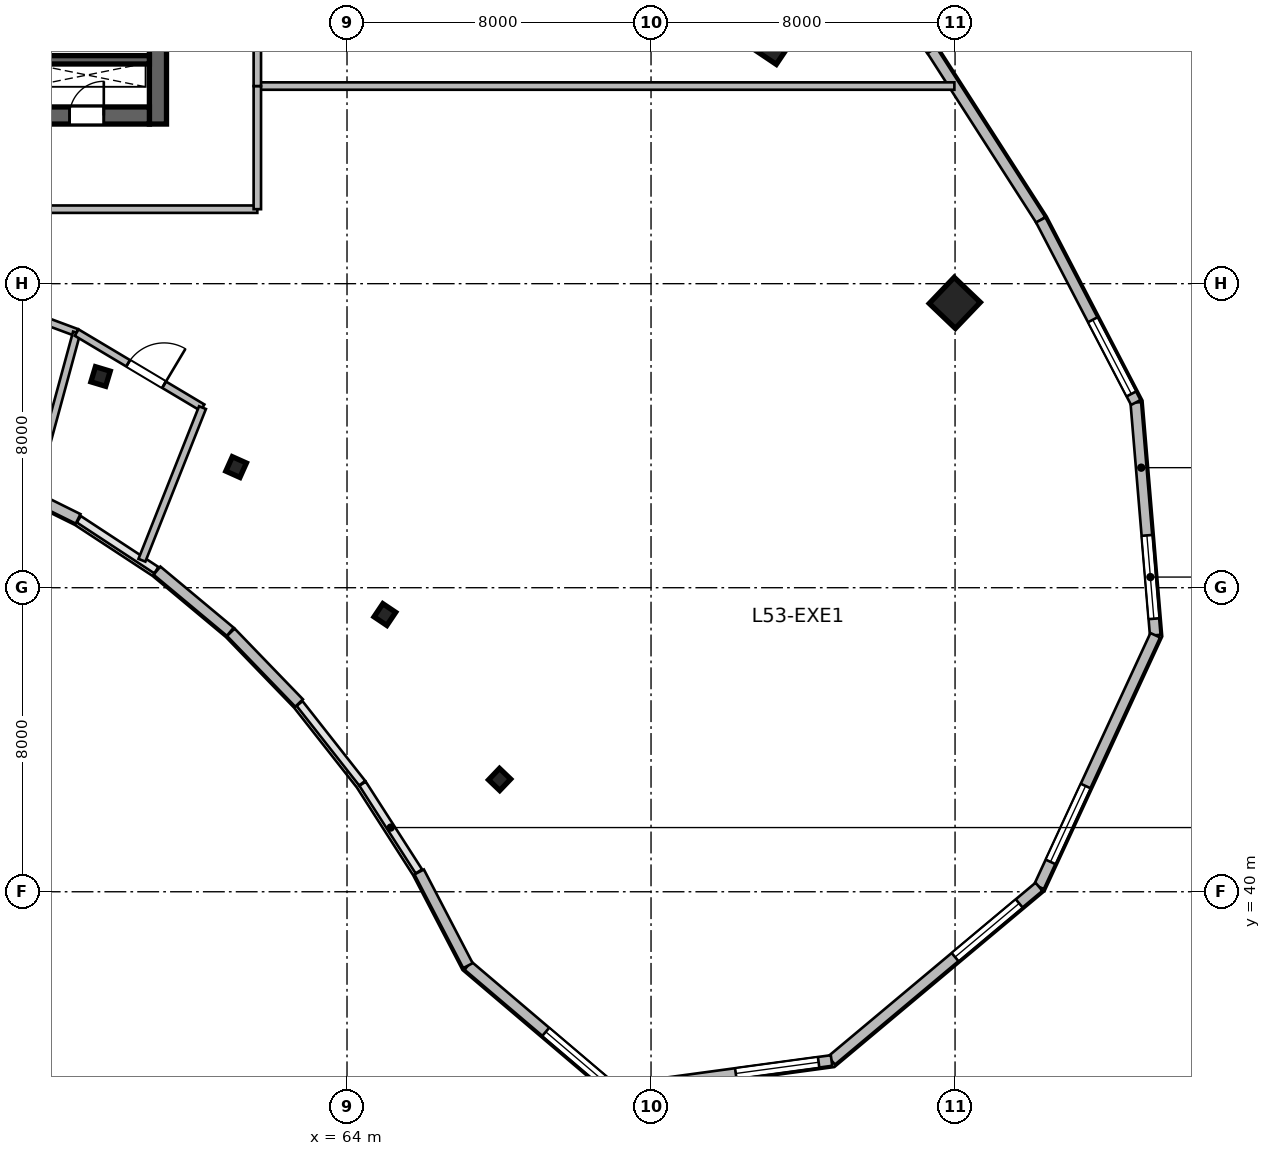
"""IFC4 building model, lengths in metres.
Left out: names, types, materials, properties, quantities, classifications, styles, units other than length and angle.
Written with IfcOpenShell. Run it as: python <this file> out.ifc"""

import sys

from ifc_helpers import new_model, si_unit, direction, frame, frame_2d, origin, origin_2d, place, context, subcontext, project, spatial, rectangle, i_section, extrude, source, transform, mapped, element, fill, save


model = new_model("IFC4")
c1 = context("Model", 3, precision=1e-05, world=origin(), true_north=direction((0.0, 1.0)))
c2 = subcontext(c1, "Body", "Model", "MODEL_VIEW")
j1 = project(units=[si_unit("LENGTHUNIT", "METRE"), si_unit("PLANEANGLEUNIT", "RADIAN")], contexts=[c1])
p1 = place(None, origin())
s1 = spatial("IfcSite", under=j1, at=p1, CompositionType="ELEMENT")
p2 = place(p1, origin())
s2 = spatial("IfcBuilding", under=s1, at=p2, CompositionType="ELEMENT")
p3 = place(p2, frame((0.0, 0.0, 219.6)))
s3 = spatial("IfcBuildingStorey", under=s2, at=p3, CompositionType="ELEMENT", Elevation=219.6)
m1 = source(origin(), c2, "Body", "SweptSolid", [
    extrude(rectangle(XDim=12.0, YDim=0.45, at=frame_2d((6.0, 0.0))), origin(), (0.0, 0.0, 1.0), 3.9),
])
p4 = place(p3, frame((59.025, 60.2, 0.0), z_axis=(0.0, 0.0, 1.0), x_axis=(0.0, 1.0, 0.0)))
e1 = element("IfcWall", 1, at=p4, inside=s3, PredefinedType="SHEAR", context=c2, shape_type="MappedRepresentation", body=[
    mapped(m1, transform((0.0, 0.0, 0.0), scale=1.0)),
])
m2 = source(origin(), c2, "Body", "SweptSolid", [
    extrude(rectangle(XDim=21.6, YDim=0.45, at=frame_2d((10.8, 0.0))), origin(), (0.0, 0.0, 1.0), 3.9),
])
p5 = place(p3, frame((37.2, 60.425, 0.0), z_axis=(0.0, 0.0, 1.0), x_axis=(1.0, 0.0, 0.0)))
e2 = element("IfcWall", 2, at=p5, inside=s3, PredefinedType="SHEAR", context=c2, shape_type="MappedRepresentation", body=[
    mapped(m2, transform((0.0, 0.0, 0.0), scale=1.0)),
])
p6 = place(p5, frame((1.1, 0.0, 0.0)))
e3 = element("IfcOpeningElement", 3, at=p6, cuts=e2, PredefinedType="OPENING", context=c2, shape_type="SweptSolid", body=[
    extrude(rectangle(XDim=1.15, YDim=2.15, at=frame_2d((0.575, 1.075))), frame((0.0, 0.235, 0.0), z_axis=(0.0, -1.0, 0.0), x_axis=(1.0, 0.0, 0.0)), (0.0, 0.0, 1.0), 0.47),
])
p7 = place(p5, frame((19.5, 0.0, 0.0)))
e4 = element("IfcOpeningElement", 4, at=p7, cuts=e2, PredefinedType="OPENING", context=c2, shape_type="SweptSolid", body=[
    extrude(rectangle(XDim=0.9, YDim=2.1, at=frame_2d((0.45, 1.05))), frame((0.0, 0.235, 0.0), z_axis=(0.0, -1.0, 0.0), x_axis=(1.0, 0.0, 0.0)), (0.0, 0.0, 1.0), 0.47),
])
p8 = place(p5, frame((12.02, 0.0, 0.0)))
e5 = element("IfcOpeningElement", 5, at=p8, cuts=e2, PredefinedType="OPENING", context=c2, shape_type="SweptSolid", body=[
    extrude(rectangle(XDim=1.6, YDim=2.15, at=frame_2d((0.8, 1.075))), frame((0.0, 0.235, 0.0), z_axis=(0.0, -1.0, 0.0), x_axis=(1.0, 0.0, 0.0)), (0.0, 0.0, 1.0), 0.47),
])
m3 = source(origin(), c2, "Body", "SweptSolid", [
    extrude(rectangle(XDim=3.27, YDim=0.22, at=frame_2d((1.635, 0.0))), origin(), (0.0, 0.0, 1.0), 3.9),
])
p9 = place(p3, frame((55.53, 61.89, 0.0), z_axis=(0.0, 0.0, 1.0), x_axis=(1.0, 0.0, 0.0)))
e6 = element("IfcWall", 6, at=p9, inside=s3, PredefinedType="SHEAR", context=c2, shape_type="MappedRepresentation", body=[
    mapped(m3, transform((0.0, 0.0, 0.0), scale=1.0)),
])
m4 = source(origin(), c2, "Body", "SweptSolid", [
    extrude(i_section(OverallWidth=0.406, OverallDepth=0.416, WebThickness=0.03, FlangeThickness=0.048, at=origin_2d()), origin(), (0.0, 0.0, 1.0), 3.9),
])
for number, where, z_axis, x_axis in (
    (7, (57.515, 53.558, 0.0), (0.0, 0.0, 1.0), (0.289, 0.957, 0.0)),
    (8, (61.082, 51.175, 0.0), (0.0, 0.0, 1.0), (0.409, 0.912, 0.0)),
    (9, (64.996, 47.294, 0.0), (0.0, 0.0, 1.0), (0.558, 0.83, 0.0)),
):
    element("IfcColumn", number, at=place(p3, frame(where, z_axis=z_axis, x_axis=x_axis)), inside=s3, PredefinedType="COLUMN", context=c2, shape_type="MappedRepresentation", body=[
        mapped(m4, transform((0.0, 0.0, 0.0), scale=1.0)),
    ])
m5 = source(origin(), c2, "Body", "SweptSolid", [
    extrude(rectangle(XDim=0.95, YDim=0.95, at=origin_2d()), origin(), (0.0, 0.0, 1.0), 3.9),
])
p10 = place(p3, frame((75.167, 62.43, 0.0), z_axis=(0.0, 0.0, 1.0), x_axis=(0.55774510898, 0.830012285095, 0.0)))
e10 = element("IfcColumn", 10, at=p10, inside=s3, PredefinedType="COLUMN", context=c2, shape_type="MappedRepresentation", body=[
    mapped(m5, transform((0.0, 0.0, 0.0), scale=1.0)),
])
p11 = place(p3, frame((68.015, 42.955, 0.0), z_axis=(0.0, 0.0, 1.0), x_axis=(0.690756218984, 0.723087716626, 0.0)))
e11 = element("IfcColumn", 11, at=p11, inside=s3, PredefinedType="COLUMN", context=c2, shape_type="MappedRepresentation", body=[
    mapped(m4, transform((0.0, 0.0, 0.0), scale=1.0)),
])
p12 = place(p3, frame((79.993, 55.494, 0.0), z_axis=(0.0, 0.0, 1.0), x_axis=(0.690756218984, 0.723087716626, 0.0)))
e12 = element("IfcColumn", 12, at=p12, inside=s3, PredefinedType="COLUMN", context=c2, shape_type="MappedRepresentation", body=[
    mapped(m5, transform((0.0, 0.0, 0.0), scale=1.0)),
])
m6 = source(origin(), c2, "Body", "SweptSolid", [
    extrude(rectangle(XDim=6.146, YDim=0.28, at=frame_2d((3.073, 0.0))), origin(), (0.0, 0.0, 1.0), 3.64),
])
p13 = place(p3, frame((84.756, 52.874, 0.0), z_axis=(0.0, 0.0, 1.0), x_axis=(0.083301904456, -0.996524356307, 0.0)))
e13 = element("IfcWall", 13, at=p13, inside=s3, PredefinedType="SOLIDWALL", context=c2, shape_type="MappedRepresentation", body=[
    mapped(m6, transform((0.0, 0.0, 0.0), scale=1.0)),
])
p14 = place(p13, frame((3.509, 0.0, 0.95)))
e14 = element("IfcOpeningElement", 14, at=p14, cuts=e13, PredefinedType="OPENING", context=c2, shape_type="SweptSolid", body=[
    extrude(rectangle(XDim=2.2, YDim=2.1, at=frame_2d((1.1, 1.05))), frame((0.0, 0.15, 0.0), z_axis=(0.0, -1.0, 0.0), x_axis=(1.0, 0.0, 0.0)), (0.0, 0.0, 1.0), 0.3),
])
m7 = source(origin(), c2, "Body", "SweptSolid", [
    extrude(rectangle(XDim=7.292, YDim=0.28, at=frame_2d((3.646, 0.0))), origin(), (0.0, 0.0, 1.0), 3.64),
])
p15 = place(p3, frame((85.268, 46.749, 0.0), z_axis=(0.0, 0.0, 1.0), x_axis=(-0.419642001049, -0.907689699708, 0.0)))
e15 = element("IfcWall", 15, at=p15, inside=s3, PredefinedType="SOLIDWALL", context=c2, shape_type="MappedRepresentation", body=[
    mapped(m7, transform((0.0, 0.0, 0.0), scale=1.0)),
])
p16 = place(p15, frame((4.369, 0.0, 0.95)))
e16 = element("IfcOpeningElement", 16, at=p16, cuts=e15, PredefinedType="OPENING", context=c2, shape_type="SweptSolid", body=[
    extrude(rectangle(XDim=2.2, YDim=2.1, at=frame_2d((1.1, 1.05))), frame((0.0, 0.15, 0.0), z_axis=(0.0, -1.0, 0.0), x_axis=(1.0, 0.0, 0.0)), (0.0, 0.0, 1.0), 0.3),
])
m8 = source(origin(), c2, "Body", "SweptSolid", [
    extrude(rectangle(XDim=7.12, YDim=0.28, at=frame_2d((3.56, 0.0))), origin(), (0.0, 0.0, 1.0), 3.64),
])
p17 = place(p3, frame((82.208, 40.131, 0.0), z_axis=(0.0, 0.0, 1.0), x_axis=(-0.766709783564, -0.641993853387, 0.0)))
e17 = element("IfcWall", 17, at=p17, inside=s3, PredefinedType="SOLIDWALL", context=c2, shape_type="MappedRepresentation", body=[
    mapped(m8, transform((0.0, 0.0, 0.0), scale=1.0)),
])
p18 = place(p17, frame((0.68, 0.0, 0.95)))
e18 = element("IfcOpeningElement", 18, at=p18, cuts=e17, PredefinedType="OPENING", context=c2, shape_type="SweptSolid", body=[
    extrude(rectangle(XDim=2.2, YDim=2.1, at=frame_2d((1.1, 1.05))), frame((0.0, 0.15, 0.0), z_axis=(0.0, -1.0, 0.0), x_axis=(1.0, 0.0, 0.0)), (0.0, 0.0, 1.0), 0.3),
])
m9 = source(origin(), c2, "Body", "SweptSolid", [
    extrude(rectangle(XDim=5.771, YDim=0.28, at=frame_2d((2.886, 0.0))), origin(), (0.0, 0.0, 1.0), 3.64),
])
p19 = place(p3, frame((76.75, 35.56, 0.0), z_axis=(0.0, 0.0, 1.0), x_axis=(-0.990933615537, -0.134352408237, 0.0)))
e19 = element("IfcWall", 19, at=p19, inside=s3, PredefinedType="SOLIDWALL", context=c2, shape_type="MappedRepresentation", body=[
    mapped(m9, transform((0.0, 0.0, 0.0), scale=1.0)),
])
p20 = place(p19, frame((0.343, 0.0, 0.95)))
e20 = element("IfcOpeningElement", 20, at=p20, cuts=e19, PredefinedType="OPENING", context=c2, shape_type="SweptSolid", body=[
    extrude(rectangle(XDim=2.2, YDim=2.1, at=frame_2d((1.1, 1.05))), frame((0.0, 0.15, 0.0), z_axis=(0.0, -1.0, 0.0), x_axis=(1.0, 0.0, 0.0)), (0.0, 0.0, 1.0), 0.3),
])
m10 = source(origin(), c2, "Body", "SweptSolid", [
    extrude(rectangle(XDim=5.051, YDim=0.28, at=frame_2d((2.525, 0.0))), origin(), (0.0, 0.0, 1.0), 3.64),
])
p21 = place(p3, frame((71.031, 34.784, 0.0), z_axis=(0.0, 0.0, 1.0), x_axis=(-0.761904731537, 0.647689107568, 0.0)))
e21 = element("IfcWall", 21, at=p21, inside=s3, PredefinedType="SOLIDWALL", context=c2, shape_type="MappedRepresentation", body=[
    mapped(m10, transform((0.0, 0.0, 0.0), scale=1.0)),
])
p22 = place(p21, frame((0.163, 0.0, 0.95)))
e22 = element("IfcOpeningElement", 22, at=p22, cuts=e21, PredefinedType="OPENING", context=c2, shape_type="SweptSolid", body=[
    extrude(rectangle(XDim=2.2, YDim=2.1, at=frame_2d((1.1, 1.05))), frame((0.0, 0.15, 0.0), z_axis=(0.0, -1.0, 0.0), x_axis=(1.0, 0.0, 0.0)), (0.0, 0.0, 1.0), 0.3),
])
m11 = source(origin(), c2, "Body", "SweptSolid", [
    extrude(rectangle(XDim=2.779, YDim=0.28, at=frame_2d((1.39, 0.0))), origin(), (0.0, 0.0, 1.0), 3.64),
])
p23 = place(p3, frame((67.182, 38.056, 0.0), z_axis=(0.0, 0.0, 1.0), x_axis=(-0.461770308601, 0.886999538948, 0.0)))
e23 = element("IfcWall", 23, at=p23, inside=s3, PredefinedType="SOLIDWALL", context=c2, shape_type="MappedRepresentation", body=[
    mapped(m11, transform((0.0, 0.0, 0.0), scale=1.0)),
])
m12 = source(origin(), c2, "Body", "SweptSolid", [
    extrude(rectangle(XDim=2.588, YDim=0.28, at=frame_2d((1.294, 0.0))), origin(), (0.0, 0.0, 1.0), 3.64),
])
p24 = place(p3, frame((62.74, 44.966, 0.0), z_axis=(0.0, 0.0, 1.0), x_axis=(-0.694687114507, 0.719312041424, 0.0)))
e24 = element("IfcWall", 24, at=p24, inside=s3, PredefinedType="SOLIDWALL", context=c2, shape_type="MappedRepresentation", body=[
    mapped(m12, transform((0.0, 0.0, 0.0), scale=1.0)),
])
m13 = source(origin(), c2, "Body", "SweptSolid", [
    extrude(rectangle(XDim=2.511, YDim=0.28, at=frame_2d((1.256, 0.0))), origin(), (0.0, 0.0, 1.0), 3.64),
])
p25 = place(p3, frame((60.928, 46.841, 0.0), z_axis=(0.0, 0.0, 1.0), x_axis=(-0.767910416122, 0.640557251782, 0.0)))
e25 = element("IfcWall", 25, at=p25, inside=s3, PredefinedType="SOLIDWALL", context=c2, shape_type="MappedRepresentation", body=[
    mapped(m13, transform((0.0, 0.0, 0.0), scale=1.0)),
])
m14 = source(origin(), c2, "Body", "SweptSolid", [
    extrude(rectangle(XDim=2.378, YDim=0.28, at=frame_2d((1.189, 0.0))), origin(), (0.0, 0.0, 1.0), 3.64),
])
p26 = place(p3, frame((56.924, 49.812, 0.0), z_axis=(0.0, 0.0, 1.0), x_axis=(-0.895941616831, 0.444171835252, 0.0)))
e26 = element("IfcWall", 26, at=p26, inside=s3, PredefinedType="SOLIDWALL", context=c2, shape_type="MappedRepresentation", body=[
    mapped(m14, transform((0.0, 0.0, 0.0), scale=1.0)),
])
m15 = source(origin(), c2, "Body", "SweptSolid", [
    extrude(rectangle(XDim=5.153, YDim=0.28, at=frame_2d((2.577, 0.0))), origin(), (0.0, 0.0, 1.0), 3.64),
])
p27 = place(p3, frame((76.205, 66.19, 0.0), z_axis=(0.0, 0.0, 1.0), x_axis=(0.618179283891, -0.786037132054, 0.0)))
e27 = element("IfcWall", 27, at=p27, inside=s3, PredefinedType="SOLIDWALL", context=c2, shape_type="MappedRepresentation", body=[
    mapped(m15, transform((0.0, 0.0, 0.0), scale=1.0)),
])
m16 = source(origin(), c2, "Body", "SweptSolid", [
    extrude(rectangle(XDim=5.303, YDim=0.28, at=frame_2d((2.651, 0.0))), origin(), (0.0, 0.0, 1.0), 3.64),
])
p28 = place(p3, frame((79.391, 62.14, 0.0), z_axis=(0.0, 0.0, 1.0), x_axis=(0.540178067041, -0.84155074469, 0.0)))
e28 = element("IfcWall", 28, at=p28, inside=s3, PredefinedType="SOLIDWALL", context=c2, shape_type="MappedRepresentation", body=[
    mapped(m16, transform((0.0, 0.0, 0.0), scale=1.0)),
])
m17 = source(origin(), c2, "Body", "SweptSolid", [
    extrude(rectangle(XDim=5.416, YDim=0.28, at=frame_2d((2.708, 0.0))), origin(), (0.0, 0.0, 1.0), 3.64),
])
p29 = place(p3, frame((82.255, 57.677, 0.0), z_axis=(0.0, 0.0, 1.0), x_axis=(0.46177852435, -0.886995261796, 0.0)))
e29 = element("IfcWall", 29, at=p29, inside=s3, PredefinedType="SOLIDWALL", context=c2, shape_type="MappedRepresentation", body=[
    mapped(m17, transform((0.0, 0.0, 0.0), scale=1.0)),
])
p30 = place(p29, frame((2.962, 0.0, 0.95)))
e30 = element("IfcOpeningElement", 30, at=p30, cuts=e29, PredefinedType="OPENING", context=c2, shape_type="SweptSolid", body=[
    extrude(rectangle(XDim=2.2, YDim=2.1, at=frame_2d((1.1, 1.05))), frame((0.0, 0.15, 0.0), z_axis=(0.0, -1.0, 0.0), x_axis=(1.0, 0.0, 0.0)), (0.0, 0.0, 1.0), 0.3),
])
m18 = source(origin(), c2, "Body", "SweptSolid", [
    extrude(rectangle(XDim=4.191, YDim=0.195, at=frame_2d((2.095, 0.0))), origin(), (0.0, 0.0, 1.0), 3.64),
])
p31 = place(p3, frame((52.957, 56.174, 0.0), z_axis=(0.0, 0.0, 1.0), x_axis=(0.937361695407, -0.348357649527, 0.0)))
e31 = element("IfcWall", 31, at=p31, inside=s3, PredefinedType="PARTITIONING", context=c2, shape_type="MappedRepresentation", body=[
    mapped(m18, transform((0.0, 0.0, 0.0), scale=1.0)),
])
p32 = place(p31, frame((1.545, 0.0, 0.0)))
e32 = element("IfcOpeningElement", 32, at=p32, cuts=e31, PredefinedType="OPENING", context=c2, shape_type="SweptSolid", body=[
    extrude(rectangle(XDim=1.1, YDim=2.15, at=frame_2d((0.55, 1.075))), frame((0.0, 0.107, 0.0), z_axis=(0.0, -1.0, 0.0), x_axis=(1.0, 0.0, 0.0)), (0.0, 0.0, 1.0), 0.215),
])
m19 = source(origin(), c2, "Body", "SweptSolid", [
    extrude(rectangle(XDim=4.449, YDim=0.195, at=frame_2d((2.225, 0.0))), origin(), (0.0, 0.0, 1.0), 3.64),
])
p33 = place(p3, frame((55.719, 50.42, 0.0), z_axis=(0.0, 0.0, 1.0), x_axis=(0.262123660516, 0.965034292965, 0.0)))
e33 = element("IfcWall", 33, at=p33, inside=s3, PredefinedType="PARTITIONING", context=c2, shape_type="MappedRepresentation", body=[
    mapped(m19, transform((0.0, 0.0, 0.0), scale=1.0)),
])
m20 = source(origin(), c2, "Body", "SweptSolid", [
    extrude(rectangle(XDim=3.856, YDim=0.195, at=frame_2d((1.928, 0.0))), origin(), (0.0, 0.0, 1.0), 3.64),
])
p34 = place(p3, frame((56.886, 54.714, 0.0), z_axis=(0.0, 0.0, 1.0), x_axis=(0.858797511375, -0.512315171019, 0.0)))
e34 = element("IfcWall", 34, at=p34, inside=s3, PredefinedType="PARTITIONING", context=c2, shape_type="MappedRepresentation", body=[
    mapped(m20, transform((0.0, 0.0, 0.0), scale=1.0)),
])
p35 = place(p34, frame((1.578, 0.0, 0.0)))
e35 = element("IfcOpeningElement", 35, at=p35, cuts=e34, PredefinedType="OPENING", context=c2, shape_type="SweptSolid", body=[
    extrude(rectangle(XDim=1.1, YDim=2.15, at=frame_2d((0.55, 1.075))), frame((0.0, 0.107, 0.0), z_axis=(0.0, -1.0, 0.0), x_axis=(1.0, 0.0, 0.0)), (0.0, 0.0, 1.0), 0.215),
])
m21 = source(origin(), c2, "Body", "SweptSolid", [
    extrude(rectangle(XDim=4.32, YDim=0.195, at=frame_2d((2.16, 0.0))), origin(), (0.0, 0.0, 1.0), 3.64),
])
p36 = place(p3, frame((58.604, 48.723, 0.0), z_axis=(0.0, 0.0, 1.0), x_axis=(0.368846295269, 0.929490403644, 0.0)))
e36 = element("IfcWall", 36, at=p36, inside=s3, PredefinedType="PARTITIONING", context=c2, shape_type="MappedRepresentation", body=[
    mapped(m21, transform((0.0, 0.0, 0.0), scale=1.0)),
])
m22 = source(origin(), c2, "Body", "SweptSolid", [
    extrude(rectangle(XDim=12.39, YDim=0.195, at=frame_2d((6.195, 0.0))), origin(), (0.0, 0.0, 1.0), 3.64),
])
p37 = place(p3, frame((49.25, 57.96, 0.0), z_axis=(0.0, 0.0, 1.0), x_axis=(1.0, 0.0, 0.0)))
e37 = element("IfcWall", 37, at=p37, inside=s3, PredefinedType="PARTITIONING", context=c2, shape_type="MappedRepresentation", body=[
    mapped(m22, transform((0.0, 0.0, 0.0), scale=1.0)),
])
m23 = source(origin(), c2, "Body", "SweptSolid", [
    extrude(rectangle(XDim=18.342, YDim=0.195, at=frame_2d((9.171, 0.0))), origin(), (0.0, 0.0, 1.0), 3.64),
])
p38 = place(p3, frame((61.64, 61.2, 0.0), z_axis=(0.0, 0.0, 1.0), x_axis=(1.0, 0.0, 0.0)))
e38 = element("IfcWall", 38, at=p38, inside=s3, PredefinedType="PARTITIONING", context=c2, shape_type="MappedRepresentation", body=[
    mapped(m23, transform((0.0, 0.0, 0.0), scale=1.0)),
])
m24 = source(origin(), c2, "Body", "SweptSolid", [
    extrude(rectangle(XDim=3.24, YDim=0.195, at=frame_2d((1.62, 0.0))), origin(), (0.0, 0.0, 1.0), 3.64),
])
p39 = place(p3, frame((61.64, 57.96, 0.0), z_axis=(0.0, 0.0, 1.0), x_axis=(0.0, 1.0, 0.0)))
e39 = element("IfcWall", 39, at=p39, inside=s3, PredefinedType="PARTITIONING", context=c2, shape_type="MappedRepresentation", body=[
    mapped(m24, transform((0.0, 0.0, 0.0), scale=1.0)),
])
m25 = source(origin(), c2, "Body", "SweptSolid", [
    extrude(rectangle(XDim=4.0, YDim=0.195, at=frame_2d((2.0, 0.0))), origin(), (0.0, 0.0, 1.0), 3.64),
])
p40 = place(p3, frame((61.64, 61.2, 0.0), z_axis=(0.0, 0.0, 1.0), x_axis=(0.0, 1.0, 0.0)))
e40 = element("IfcWall", 40, at=p40, inside=s3, PredefinedType="PARTITIONING", context=c2, shape_type="MappedRepresentation", body=[
    mapped(m25, transform((0.0, 0.0, 0.0), scale=1.0)),
])
p41 = place(p40, frame((1.045, 0.0, 0.0)))
e41 = element("IfcOpeningElement", 41, at=p41, cuts=e40, PredefinedType="OPENING", context=c2, shape_type="SweptSolid", body=[
    extrude(rectangle(XDim=0.95, YDim=2.1, at=frame_2d((0.475, 1.05))), frame((0.0, 0.107, 0.0), z_axis=(0.0, -1.0, 0.0), x_axis=(1.0, 0.0, 0.0)), (0.0, 0.0, 1.0), 0.215),
])
m26 = source(origin(), c2, "Body", "SweptSolid", [
    extrude(rectangle(XDim=2.2, YDim=2.1, at=frame_2d((1.1, 1.05))), frame((0.0, 0.03, 0.0), z_axis=(0.0, -1.0, 0.0), x_axis=(1.0, 0.0, 0.0)), (0.0, 0.0, 1.0), 0.06),
])
p42 = place(p14, origin())
e42 = element("IfcWindow", 42, at=p42, inside=s3, PartitioningType="TRIPLE_PANEL_VERTICAL", PredefinedType="WINDOW", context=c2, shape_type="MappedRepresentation", body=[
    mapped(m26, transform((0.0, 0.0, 0.0), scale=1.0)),
])
fill(e14, e42)
p43 = place(p16, origin())
e43 = element("IfcWindow", 43, at=p43, inside=s3, PartitioningType="TRIPLE_PANEL_VERTICAL", PredefinedType="WINDOW", context=c2, shape_type="MappedRepresentation", body=[
    mapped(m26, transform((0.0, 0.0, 0.0), scale=1.0)),
])
fill(e16, e43)
p44 = place(p18, origin())
e44 = element("IfcWindow", 44, at=p44, inside=s3, PartitioningType="TRIPLE_PANEL_VERTICAL", PredefinedType="WINDOW", context=c2, shape_type="MappedRepresentation", body=[
    mapped(m26, transform((0.0, 0.0, 0.0), scale=1.0)),
])
fill(e18, e44)
p45 = place(p20, origin())
e45 = element("IfcWindow", 45, at=p45, inside=s3, PartitioningType="TRIPLE_PANEL_VERTICAL", PredefinedType="WINDOW", context=c2, shape_type="MappedRepresentation", body=[
    mapped(m26, transform((0.0, 0.0, 0.0), scale=1.0)),
])
fill(e20, e45)
p46 = place(p22, origin())
e46 = element("IfcWindow", 46, at=p46, inside=s3, PartitioningType="TRIPLE_PANEL_VERTICAL", PredefinedType="WINDOW", context=c2, shape_type="MappedRepresentation", body=[
    mapped(m26, transform((0.0, 0.0, 0.0), scale=1.0)),
])
fill(e22, e46)
p47 = place(p30, origin())
e47 = element("IfcWindow", 47, at=p47, inside=s3, PartitioningType="TRIPLE_PANEL_VERTICAL", PredefinedType="WINDOW", context=c2, shape_type="MappedRepresentation", body=[
    mapped(m26, transform((0.0, 0.0, 0.0), scale=1.0)),
])
fill(e30, e47)
m27 = source(origin(), c2, "Body", "SweptSolid", [
    extrude(rectangle(XDim=0.9, YDim=2.1, at=frame_2d((0.45, 1.05))), frame((0.0, 0.025, 0.0), z_axis=(0.0, -1.0, 0.0), x_axis=(1.0, 0.0, 0.0)), (0.0, 0.0, 1.0), 0.05),
])
p48 = place(p7, origin())
e48 = element("IfcDoor", 48, at=p48, inside=s3, OperationType="SINGLE_SWING_RIGHT", PredefinedType="DOOR", context=c2, shape_type="MappedRepresentation", body=[
    mapped(m27, transform((0.0, 0.0, 0.0), scale=1.0)),
])
fill(e4, e48)
m28 = source(origin(), c2, "Body", "SweptSolid", [
    extrude(rectangle(XDim=1.1, YDim=2.15, at=frame_2d((0.55, 1.075))), frame((0.0, 0.025, 0.0), z_axis=(0.0, -1.0, 0.0), x_axis=(1.0, 0.0, 0.0)), (0.0, 0.0, 1.0), 0.05),
])
p49 = place(p35, origin())
e49 = element("IfcDoor", 49, at=p49, inside=s3, OperationType="SINGLE_SWING_RIGHT", PredefinedType="DOOR", context=c2, shape_type="MappedRepresentation", body=[
    mapped(m28, transform((0.0, 0.0, 0.0), scale=1.0)),
])
fill(e35, e49)
save(model, sys.argv[1])
